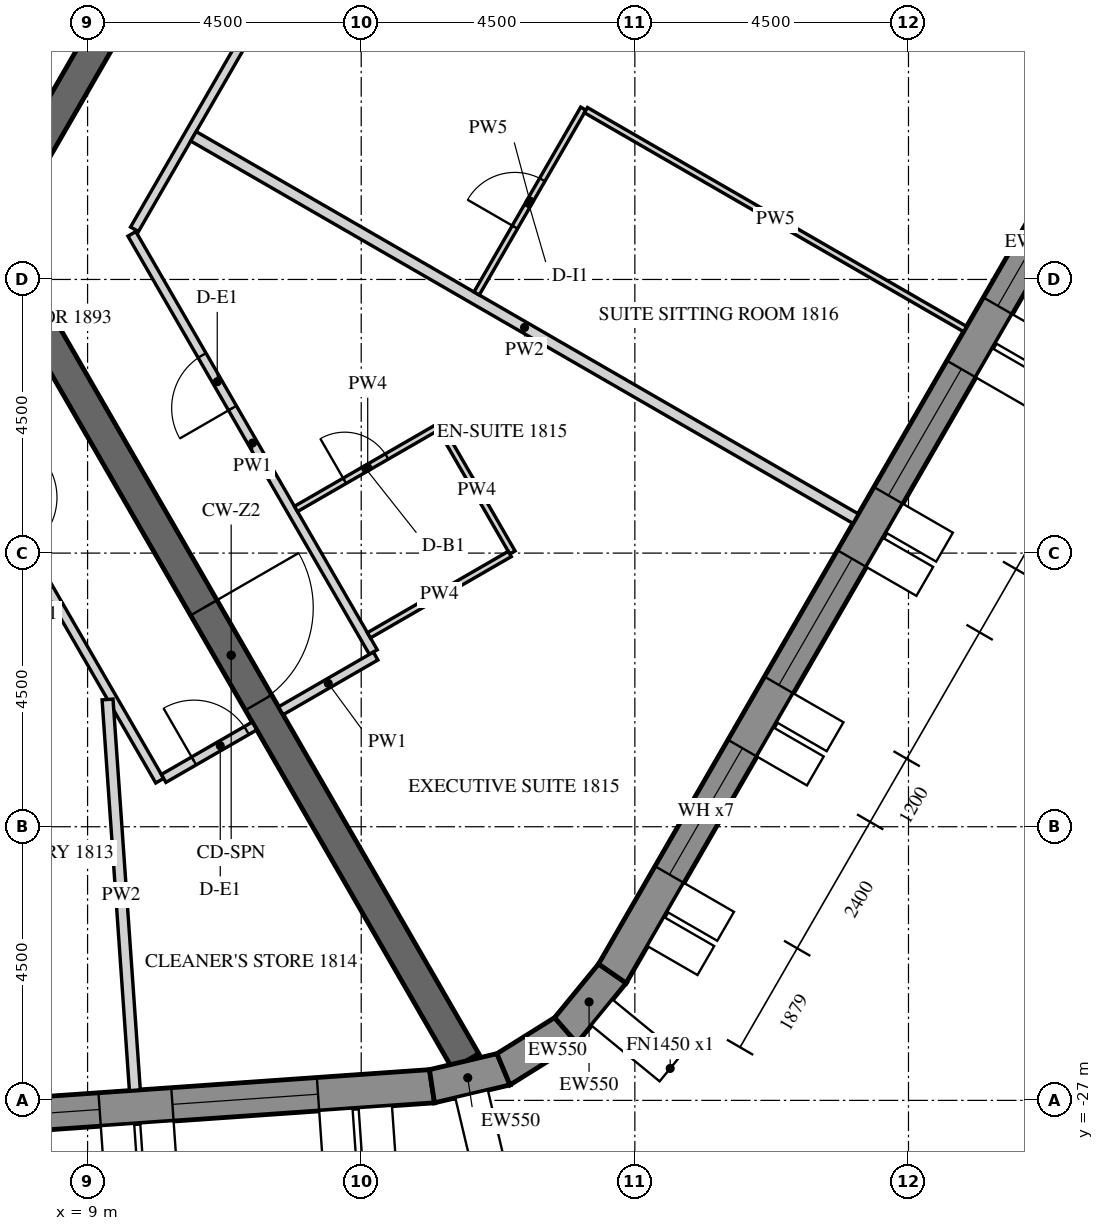
"""IFC4 building model, lengths in metres.
Left out: names, types, materials, properties, quantities, classifications, styles, units other than length and angle.
Written with IfcOpenShell. Run it as: python <this file> out.ifc"""

import sys

from ifc_helpers import new_model, si_unit, direction, frame, frame_2d, origin, place, context, subcontext, project, spatial, polyline, rectangle, outline, extrude, element, fill, save


model = new_model("IFC4")
c1 = context("Model", 3, precision=1e-05, world=origin(), true_north=direction((0.0, 1.0)))
c2 = subcontext(c1, "Body", "Model", "MODEL_VIEW")
j1 = project(units=[si_unit("LENGTHUNIT", "METRE"), si_unit("PLANEANGLEUNIT", "RADIAN")], contexts=[c1])
p1 = place(None, origin())
s1 = spatial("IfcSite", under=j1, at=p1, CompositionType="ELEMENT")
p2 = place(p1, origin())
s2 = spatial("IfcBuilding", under=s1, at=p2, CompositionType="ELEMENT")
p3 = place(p2, frame((0.0, 0.0, 226.8)))
s3 = spatial("IfcBuildingStorey", under=s2, at=p3, CompositionType="ELEMENT", Elevation=226.8)
p4 = place(p3, frame((-13.026, -28.704, -0.15), z_axis=(0.0, 0.0, 1.0), x_axis=(0.99756406806, 0.069756219185, 0.0)))
e1 = element("IfcWall", 1, at=p4, inside=s3, PredefinedType="SOLIDWALL", context=c2, shape_type="SweptSolid", body=[
    extrude(outline(polyline([(-0.026, -0.275), (27.78, -0.275), (27.735, 0.275), (0.026, 0.275), (-0.026, -0.275)])), origin(), (0.0, 0.0, 1.0), 3.9),
])
p5 = place(p4, frame((1.879, 0.0, 1.05)))
e2 = element("IfcOpeningElement", 2, at=p5, cuts=e1, PredefinedType="OPENING", context=c2, shape_type="SweptSolid", body=[
    extrude(rectangle(XDim=2.4, YDim=2.4, at=frame_2d((1.2, 1.2))), frame((0.0, 0.285, 0.0), z_axis=(0.0, -1.0, 0.0), x_axis=(1.0, 0.0, 0.0)), (0.0, 0.0, 1.0), 0.57),
])
p6 = place(p4, frame((5.479, 0.0, 1.05)))
e3 = element("IfcOpeningElement", 3, at=p6, cuts=e1, PredefinedType="OPENING", context=c2, shape_type="SweptSolid", body=[
    extrude(rectangle(XDim=2.4, YDim=2.4, at=frame_2d((1.2, 1.2))), frame((0.0, 0.285, 0.0), z_axis=(0.0, -1.0, 0.0), x_axis=(1.0, 0.0, 0.0)), (0.0, 0.0, 1.0), 0.57),
])
p7 = place(p4, frame((9.079, 0.0, 1.05)))
e4 = element("IfcOpeningElement", 4, at=p7, cuts=e1, PredefinedType="OPENING", context=c2, shape_type="SweptSolid", body=[
    extrude(rectangle(XDim=2.4, YDim=2.4, at=frame_2d((1.2, 1.2))), frame((0.0, 0.285, 0.0), z_axis=(0.0, -1.0, 0.0), x_axis=(1.0, 0.0, 0.0)), (0.0, 0.0, 1.0), 0.57),
])
p8 = place(p4, frame((12.679, 0.0, 1.05)))
e5 = element("IfcOpeningElement", 5, at=p8, cuts=e1, PredefinedType="OPENING", context=c2, shape_type="SweptSolid", body=[
    extrude(rectangle(XDim=2.4, YDim=2.4, at=frame_2d((1.2, 1.2))), frame((0.0, 0.285, 0.0), z_axis=(0.0, -1.0, 0.0), x_axis=(1.0, 0.0, 0.0)), (0.0, 0.0, 1.0), 0.57),
])
p9 = place(p4, frame((16.279, 0.0, 1.05)))
e6 = element("IfcOpeningElement", 6, at=p9, cuts=e1, PredefinedType="OPENING", context=c2, shape_type="SweptSolid", body=[
    extrude(rectangle(XDim=2.4, YDim=2.4, at=frame_2d((1.2, 1.2))), frame((0.0, 0.285, 0.0), z_axis=(0.0, -1.0, 0.0), x_axis=(1.0, 0.0, 0.0)), (0.0, 0.0, 1.0), 0.57),
])
p10 = place(p4, frame((19.879, 0.0, 1.05)))
e7 = element("IfcOpeningElement", 7, at=p10, cuts=e1, PredefinedType="OPENING", context=c2, shape_type="SweptSolid", body=[
    extrude(rectangle(XDim=2.4, YDim=2.4, at=frame_2d((1.2, 1.2))), frame((0.0, 0.285, 0.0), z_axis=(0.0, -1.0, 0.0), x_axis=(1.0, 0.0, 0.0)), (0.0, 0.0, 1.0), 0.57),
])
p11 = place(p4, frame((23.479, 0.0, 1.05)))
e8 = element("IfcOpeningElement", 8, at=p11, cuts=e1, PredefinedType="OPENING", context=c2, shape_type="SweptSolid", body=[
    extrude(rectangle(XDim=2.4, YDim=2.4, at=frame_2d((1.2, 1.2))), frame((0.0, 0.285, 0.0), z_axis=(0.0, -1.0, 0.0), x_axis=(1.0, 0.0, 0.0)), (0.0, 0.0, 1.0), 0.57),
])
p12 = place(p3, frame((14.664, -26.767, -0.15), z_axis=(0.0, 0.0, 1.0), x_axis=(0.973063591128, 0.230536868247, 0.0)))
e9 = element("IfcWall", 9, at=p12, inside=s3, PredefinedType="SOLIDWALL", context=c2, shape_type="SweptSolid", body=[
    extrude(outline(polyline([(-0.022, -0.275), (1.253, -0.275), (1.163, 0.275), (0.022, 0.275), (-0.022, -0.275)])), origin(), (0.0, 0.0, 1.0), 3.9),
])
p13 = place(p3, frame((15.84, -26.489, -0.15), z_axis=(0.0, 0.0, 1.0), x_axis=(0.848009655012, 0.52998077796, 0.0)))
e10 = element("IfcWall", 10, at=p13, inside=s3, PredefinedType="SOLIDWALL", context=c2, shape_type="SweptSolid", body=[
    extrude(outline(polyline([(-0.045, -0.275), (1.253, -0.275), (1.163, 0.275), (0.045, 0.275), (-0.045, -0.275)])), origin(), (0.0, 0.0, 1.0), 3.9),
])
p14 = place(p3, frame((16.864, -25.848, -0.15), z_axis=(0.0, 0.0, 1.0), x_axis=(0.633842757806, 0.773461930787, 0.0)))
e11 = element("IfcWall", 11, at=p14, inside=s3, PredefinedType="SOLIDWALL", context=c2, shape_type="SweptSolid", body=[
    extrude(outline(polyline([(-0.045, -0.275), (1.231, -0.275), (1.186, 0.275), (0.045, 0.275), (-0.045, -0.275)])), origin(), (0.0, 0.0, 1.0), 3.9),
])
p15 = place(p3, frame((17.63, -24.914, -0.15), z_axis=(0.0, 0.0, 1.0), x_axis=(0.499998569178, 0.866026229868, 0.0)))
e12 = element("IfcWall", 12, at=p15, inside=s3, PredefinedType="SOLIDWALL", context=c2, shape_type="SweptSolid", body=[
    extrude(outline(polyline([(-0.022, -0.275), (27.783, -0.275), (27.732, 0.275), (0.022, 0.275), (-0.022, -0.275)])), origin(), (0.0, 0.0, 1.0), 3.9),
])
p16 = place(p15, frame((1.879, 0.0, 1.05)))
e13 = element("IfcOpeningElement", 13, at=p16, cuts=e12, PredefinedType="OPENING", context=c2, shape_type="SweptSolid", body=[
    extrude(rectangle(XDim=2.4, YDim=2.4, at=frame_2d((1.2, 1.2))), frame((0.0, 0.285, 0.0), z_axis=(0.0, -1.0, 0.0), x_axis=(1.0, 0.0, 0.0)), (0.0, 0.0, 1.0), 0.57),
])
p17 = place(p15, frame((5.479, 0.0, 1.05)))
e14 = element("IfcOpeningElement", 14, at=p17, cuts=e12, PredefinedType="OPENING", context=c2, shape_type="SweptSolid", body=[
    extrude(rectangle(XDim=2.4, YDim=2.4, at=frame_2d((1.2, 1.2))), frame((0.0, 0.285, 0.0), z_axis=(0.0, -1.0, 0.0), x_axis=(1.0, 0.0, 0.0)), (0.0, 0.0, 1.0), 0.57),
])
p18 = place(p15, frame((9.079, 0.0, 1.05)))
e15 = element("IfcOpeningElement", 15, at=p18, cuts=e12, PredefinedType="OPENING", context=c2, shape_type="SweptSolid", body=[
    extrude(rectangle(XDim=2.4, YDim=2.4, at=frame_2d((1.2, 1.2))), frame((0.0, 0.285, 0.0), z_axis=(0.0, -1.0, 0.0), x_axis=(1.0, 0.0, 0.0)), (0.0, 0.0, 1.0), 0.57),
])
p19 = place(p15, frame((12.679, 0.0, 1.05)))
e16 = element("IfcOpeningElement", 16, at=p19, cuts=e12, PredefinedType="OPENING", context=c2, shape_type="SweptSolid", body=[
    extrude(rectangle(XDim=2.4, YDim=2.4, at=frame_2d((1.2, 1.2))), frame((0.0, 0.285, 0.0), z_axis=(0.0, -1.0, 0.0), x_axis=(1.0, 0.0, 0.0)), (0.0, 0.0, 1.0), 0.57),
])
p20 = place(p15, frame((16.279, 0.0, 1.05)))
e17 = element("IfcOpeningElement", 17, at=p20, cuts=e12, PredefinedType="OPENING", context=c2, shape_type="SweptSolid", body=[
    extrude(rectangle(XDim=2.4, YDim=2.4, at=frame_2d((1.2, 1.2))), frame((0.0, 0.285, 0.0), z_axis=(0.0, -1.0, 0.0), x_axis=(1.0, 0.0, 0.0)), (0.0, 0.0, 1.0), 0.57),
])
p21 = place(p15, frame((19.879, 0.0, 1.05)))
e18 = element("IfcOpeningElement", 18, at=p21, cuts=e12, PredefinedType="OPENING", context=c2, shape_type="SweptSolid", body=[
    extrude(rectangle(XDim=2.4, YDim=2.4, at=frame_2d((1.2, 1.2))), frame((0.0, 0.285, 0.0), z_axis=(0.0, -1.0, 0.0), x_axis=(1.0, 0.0, 0.0)), (0.0, 0.0, 1.0), 0.57),
])
p22 = place(p15, frame((23.479, 0.0, 1.05)))
e19 = element("IfcOpeningElement", 19, at=p22, cuts=e12, PredefinedType="OPENING", context=c2, shape_type="SweptSolid", body=[
    extrude(rectangle(XDim=2.4, YDim=2.4, at=frame_2d((1.2, 1.2))), frame((0.0, 0.285, 0.0), z_axis=(0.0, -1.0, 0.0), x_axis=(1.0, 0.0, 0.0)), (0.0, 0.0, 1.0), 0.57),
])
p23 = place(p3, frame((7.361, -12.75, -0.15), z_axis=(0.0, 0.0, 1.0), x_axis=(0.50000571537, 0.866022103989, 0.0)))
e20 = element("IfcWall", 20, at=p23, inside=s3, PredefinedType="SHEAR", context=c2, shape_type="SweptSolid", body=[
    extrude(outline(polyline([(-0.144, -0.25), (14.867, -0.25), (14.578, 0.25), (0.144, 0.25), (-0.144, -0.25)])), origin(), (0.0, 0.0, 1.0), 3.9),
])
p24 = place(p23, frame((6.49, 0.0, 0.15)))
e21 = element("IfcOpeningElement", 21, at=p24, cuts=e20, PredefinedType="OPENING", context=c2, shape_type="SweptSolid", body=[
    extrude(rectangle(XDim=1.8, YDim=2.4, at=frame_2d((0.9, 1.2))), frame((0.0, 0.26, 0.0), z_axis=(0.0, -1.0, 0.0), x_axis=(1.0, 0.0, 0.0)), (0.0, 0.0, 1.0), 0.52),
])
p25 = place(p3, frame((7.506, -13.0, -0.15), z_axis=(0.0, 0.0, 1.0), x_axis=(0.499988271576, -0.866032175087, 0.0)))
e22 = element("IfcWall", 22, at=p25, inside=s3, PredefinedType="SHEAR", context=c2, shape_type="SweptSolid", body=[
    extrude(rectangle(XDim=15.424, YDim=0.5, at=frame_2d((7.712, 0.0))), origin(), (0.0, 0.0, 1.0), 3.9),
])
p26 = place(p25, frame((6.812, 0.0, 0.15)))
e23 = element("IfcOpeningElement", 23, at=p26, cuts=e22, PredefinedType="OPENING", context=c2, shape_type="SweptSolid", body=[
    extrude(rectangle(XDim=1.8, YDim=2.4, at=frame_2d((0.9, 1.2))), frame((0.0, 0.26, 0.0), z_axis=(0.0, -1.0, 0.0), x_axis=(1.0, 0.0, 0.0)), (0.0, 0.0, 1.0), 0.52),
])
p27 = place(p3, frame((5.673, -9.825, -0.15), z_axis=(0.0, 0.0, 1.0), x_axis=(0.499995046907, 0.866028263435, 0.0)))
e24 = element("IfcWall", 24, at=p27, inside=s3, PredefinedType="SHEAR", context=c2, shape_type="SweptSolid", body=[
    extrude(outline(polyline([(-0.101, -0.175), (11.446, -0.175), (11.244, 0.175), (0.101, 0.175), (-0.101, -0.175)])), origin(), (0.0, 0.0, 1.0), 3.9),
])
p28 = place(p27, frame((4.801, 0.0, 0.15)))
e25 = element("IfcOpeningElement", 25, at=p28, cuts=e24, PredefinedType="OPENING", context=c2, shape_type="SweptSolid", body=[
    extrude(rectangle(XDim=1.8, YDim=2.4, at=frame_2d((0.9, 1.2))), frame((0.0, 0.185, 0.0), z_axis=(0.0, -1.0, 0.0), x_axis=(1.0, 0.0, 0.0)), (0.0, 0.0, 1.0), 0.37),
])
p29 = place(p3, frame((6.221, -14.875, 0.0), z_axis=(0.0, 0.0, 1.0), x_axis=(0.499989830942, -0.866031274813, 0.0)))
e26 = element("IfcWall", 26, at=p29, inside=s3, PredefinedType="PARTITIONING", context=c2, shape_type="SweptSolid", body=[
    extrude(rectangle(XDim=7.93, YDim=0.15, at=frame_2d((3.965, 0.0))), origin(), (0.0, 0.0, 1.0), 2.988),
])
p30 = place(p29, frame((2.552, 0.0, 0.0)))
e27 = element("IfcOpeningElement", 27, at=p30, cuts=e26, PredefinedType="OPENING", context=c2, shape_type="SweptSolid", body=[
    extrude(rectangle(XDim=1.0, YDim=2.1, at=frame_2d((0.5, 1.05))), frame((0.0, 0.085, 0.0), z_axis=(0.0, -1.0, 0.0), x_axis=(1.0, 0.0, 0.0)), (0.0, 0.0, 1.0), 0.17),
])
p31 = place(p3, frame((10.251, -21.705, 0.0), z_axis=(0.0, 0.0, 1.0), x_axis=(0.866013532718, 0.500020560727, 0.0)))
e28 = element("IfcWall", 28, at=p31, inside=s3, PredefinedType="PARTITIONING", context=c2, shape_type="SweptSolid", body=[
    extrude(rectangle(XDim=1.725, YDim=0.15, at=frame_2d((0.863, 0.0))), origin(), (0.0, 0.0, 1.0), 2.988),
])
p32 = place(p31, frame((0.575, 0.0, 0.0)))
e29 = element("IfcOpeningElement", 29, at=p32, cuts=e28, PredefinedType="OPENING", context=c2, shape_type="SweptSolid", body=[
    extrude(rectangle(XDim=1.0, YDim=2.1, at=frame_2d((0.5, 1.05))), frame((0.0, 0.085, 0.0), z_axis=(0.0, -1.0, 0.0), x_axis=(1.0, 0.0, 0.0)), (0.0, 0.0, 1.0), 0.17),
])
p33 = place(p3, frame((13.699, -19.628, 0.0), z_axis=(0.0, 0.0, 1.0), x_axis=(-0.499997422768, 0.866026891745, 0.0)))
e30 = element("IfcWall", 30, at=p33, inside=s3, PredefinedType="PARTITIONING", context=c2, shape_type="SweptSolid", body=[
    extrude(rectangle(XDim=7.942, YDim=0.15, at=frame_2d((3.971, 0.0))), origin(), (0.0, 0.0, 1.0), 2.988),
])
p34 = place(p33, frame((4.634, 0.0, 0.0)))
e31 = element("IfcOpeningElement", 31, at=p34, cuts=e30, PredefinedType="OPENING", context=c2, shape_type="SweptSolid", body=[
    extrude(rectangle(XDim=1.0, YDim=2.1, at=frame_2d((0.5, 1.05))), frame((0.0, 0.085, 0.0), z_axis=(0.0, -1.0, 0.0), x_axis=(1.0, 0.0, 0.0)), (0.0, 0.0, 1.0), 0.17),
])
p35 = place(p3, frame((9.772, -12.675, 0.0), z_axis=(0.0, 0.0, 1.0), x_axis=(0.499996322767, 0.866027526826, 0.0)))
e32 = element("IfcWall", 32, at=p35, inside=s3, PredefinedType="PARTITIONING", context=c2, shape_type="SweptSolid", body=[
    extrude(rectangle(XDim=14.636, YDim=0.15, at=frame_2d((7.318, 0.0))), origin(), (0.0, 0.0, 1.0), 2.988),
])
p36 = place(p35, frame((5.309, 0.0, 0.0)))
e33 = element("IfcOpeningElement", 33, at=p36, cuts=e32, PredefinedType="OPENING", context=c2, shape_type="SweptSolid", body=[
    extrude(rectangle(XDim=1.0, YDim=2.1, at=frame_2d((0.5, 1.05))), frame((0.0, 0.085, 0.0), z_axis=(0.0, -1.0, 0.0), x_axis=(1.0, 0.0, 0.0)), (0.0, 0.0, 1.0), 0.17),
])
p37 = place(p35, frame((13.486, 0.0, 0.0)))
e34 = element("IfcOpeningElement", 34, at=p37, cuts=e32, PredefinedType="OPENING", context=c2, shape_type="SweptSolid", body=[
    extrude(rectangle(XDim=1.0, YDim=2.1, at=frame_2d((0.5, 1.05))), frame((0.0, 0.085, 0.0), z_axis=(0.0, -1.0, 0.0), x_axis=(1.0, 0.0, 0.0)), (0.0, 0.0, 1.0), 0.17),
])
p38 = place(p3, frame((12.178, -20.593, 0.0), z_axis=(0.0, 0.0, 1.0), x_axis=(0.866047807691, 0.499961193289, 0.0)))
e35 = element("IfcWall", 35, at=p38, inside=s3, PredefinedType="PARTITIONING", context=c2, shape_type="SweptSolid", body=[
    extrude(rectangle(XDim=1.8, YDim=0.15, at=frame_2d((0.9, 0.0))), origin(), (0.0, 0.0, 1.0), 2.988),
])
p39 = place(p3, frame((9.778, -26.833, 0.0), z_axis=(0.0, 0.0, 1.0), x_axis=(-0.069733334443, 0.997565668048, 0.0)))
e36 = element("IfcWall", 36, at=p39, inside=s3, PredefinedType="PARTITIONING", context=c2, shape_type="SweptSolid", body=[
    extrude(rectangle(XDim=6.442, YDim=0.18, at=frame_2d((3.221, 0.0))), origin(), (0.0, 0.0, 1.0), 2.988),
])
p40 = place(p3, frame((12.427, -17.274, 0.0), z_axis=(0.0, 0.0, 1.0), x_axis=(0.866051307416, 0.49995513091, 0.0)))
e37 = element("IfcWall", 37, at=p40, inside=s3, PredefinedType="PARTITIONING", context=c2, shape_type="SweptSolid", body=[
    extrude(rectangle(XDim=2.725, YDim=0.1, at=frame_2d((1.362, 0.0))), origin(), (0.0, 0.0, 1.0), 2.988),
])
p41 = place(p40, frame((0.925, 0.0, 0.0)))
e38 = element("IfcOpeningElement", 38, at=p41, cuts=e37, PredefinedType="OPENING", context=c2, shape_type="SweptSolid", body=[
    extrude(rectangle(XDim=0.8, YDim=2.1, at=frame_2d((0.4, 1.05))), frame((0.0, 0.06, 0.0), z_axis=(0.0, -1.0, 0.0), x_axis=(1.0, 0.0, 0.0)), (0.0, 0.0, 1.0), 0.12),
])
p42 = place(p3, frame((14.812, -15.955, 0.0), z_axis=(0.0, 0.0, 1.0), x_axis=(0.499938297808, -0.866061024631, 0.0)))
e39 = element("IfcWall", 39, at=p42, inside=s3, PredefinedType="PARTITIONING", context=c2, shape_type="SweptSolid", body=[
    extrude(rectangle(XDim=2.35, YDim=0.1, at=frame_2d((1.175, 0.0))), origin(), (0.0, 0.0, 1.0), 2.988),
])
p43 = place(p3, frame((15.943, -18.015, 0.0), z_axis=(0.0, 0.0, 1.0), x_axis=(-0.866004723184, -0.50003581814, 0.0)))
e40 = element("IfcWall", 40, at=p43, inside=s3, PredefinedType="PARTITIONING", context=c2, shape_type="SweptSolid", body=[
    extrude(rectangle(XDim=2.675, YDim=0.1, at=frame_2d((1.337, 0.0))), origin(), (0.0, 0.0, 1.0), 2.988),
])
p44 = place(p3, frame((21.631, -17.433, 0.0), z_axis=(0.0, 0.0, 1.0), x_axis=(-0.866032662629, 0.499987427101, 0.0)))
e41 = element("IfcWall", 41, at=p44, inside=s3, PredefinedType="PARTITIONING", context=c2, shape_type="SweptSolid", body=[
    extrude(rectangle(XDim=12.575, YDim=0.18, at=frame_2d((6.288, 0.0))), origin(), (0.0, 0.0, 1.0), 2.988),
])
p45 = place(p3, frame((15.398, -13.73, 0.0), z_axis=(0.0, 0.0, 1.0), x_axis=(0.499969314921, 0.866043119098, 0.0)))
e42 = element("IfcWall", 42, at=p45, inside=s3, PredefinedType="PARTITIONING", context=c2, shape_type="SweptSolid", body=[
    extrude(rectangle(XDim=3.51, YDim=0.1, at=frame_2d((1.755, 0.0))), origin(), (0.0, 0.0, 1.0), 2.988),
])
p46 = place(p45, frame((1.26, 0.0, 0.0)))
e43 = element("IfcOpeningElement", 43, at=p46, cuts=e42, PredefinedType="OPENING", context=c2, shape_type="SweptSolid", body=[
    extrude(rectangle(XDim=0.9, YDim=2.1, at=frame_2d((0.45, 1.05))), frame((0.0, 0.06, 0.0), z_axis=(0.0, -1.0, 0.0), x_axis=(1.0, 0.0, 0.0)), (0.0, 0.0, 1.0), 0.12),
])
p47 = place(p3, frame((17.196, -10.716, 0.0), z_axis=(0.0, 0.0, 1.0), x_axis=(0.866033125095, -0.499986626058, 0.0)))
e44 = element("IfcWall", 44, at=p47, inside=s3, PredefinedType="PARTITIONING", context=c2, shape_type="SweptSolid", body=[
    extrude(rectangle(XDim=7.2, YDim=0.1, at=frame_2d((3.6, 0.0))), origin(), (0.0, 0.0, 1.0), 2.988),
])
p48 = place(p10, frame((0.0, 0.205, 0.0)))
e45 = element("IfcWindow", 45, at=p48, inside=s3, PartitioningType="DOUBLE_PANEL_VERTICAL", PredefinedType="WINDOW", context=c2, shape_type="SweptSolid", body=[
    extrude(rectangle(XDim=2.4, YDim=2.4, at=frame_2d((1.2, 1.2))), frame((0.0, 0.03, 0.0), z_axis=(0.0, -1.0, 0.0), x_axis=(1.0, 0.0, 0.0)), (0.0, 0.0, 1.0), 0.06),
])
fill(e7, e45)
p49 = place(p11, frame((0.0, 0.205, 0.0)))
e46 = element("IfcWindow", 46, at=p49, inside=s3, PartitioningType="DOUBLE_PANEL_VERTICAL", PredefinedType="WINDOW", context=c2, shape_type="SweptSolid", body=[
    extrude(rectangle(XDim=2.4, YDim=2.4, at=frame_2d((1.2, 1.2))), frame((0.0, 0.03, 0.0), z_axis=(0.0, -1.0, 0.0), x_axis=(1.0, 0.0, 0.0)), (0.0, 0.0, 1.0), 0.06),
])
fill(e8, e46)
p50 = place(p16, frame((0.0, 0.205, 0.0)))
e47 = element("IfcWindow", 47, at=p50, inside=s3, PartitioningType="DOUBLE_PANEL_VERTICAL", PredefinedType="WINDOW", context=c2, shape_type="SweptSolid", body=[
    extrude(rectangle(XDim=2.4, YDim=2.4, at=frame_2d((1.2, 1.2))), frame((0.0, 0.03, 0.0), z_axis=(0.0, -1.0, 0.0), x_axis=(1.0, 0.0, 0.0)), (0.0, 0.0, 1.0), 0.06),
])
fill(e13, e47)
p51 = place(p17, frame((0.0, 0.205, 0.0)))
e48 = element("IfcWindow", 48, at=p51, inside=s3, PartitioningType="DOUBLE_PANEL_VERTICAL", PredefinedType="WINDOW", context=c2, shape_type="SweptSolid", body=[
    extrude(rectangle(XDim=2.4, YDim=2.4, at=frame_2d((1.2, 1.2))), frame((0.0, 0.03, 0.0), z_axis=(0.0, -1.0, 0.0), x_axis=(1.0, 0.0, 0.0)), (0.0, 0.0, 1.0), 0.06),
])
fill(e14, e48)
p52 = place(p18, frame((0.0, 0.205, 0.0)))
e49 = element("IfcWindow", 49, at=p52, inside=s3, PartitioningType="DOUBLE_PANEL_VERTICAL", PredefinedType="WINDOW", context=c2, shape_type="SweptSolid", body=[
    extrude(rectangle(XDim=2.4, YDim=2.4, at=frame_2d((1.2, 1.2))), frame((0.0, 0.03, 0.0), z_axis=(0.0, -1.0, 0.0), x_axis=(1.0, 0.0, 0.0)), (0.0, 0.0, 1.0), 0.06),
])
fill(e15, e49)
p53 = place(p19, frame((0.0, 0.205, 0.0)))
e50 = element("IfcWindow", 50, at=p53, inside=s3, PartitioningType="DOUBLE_PANEL_VERTICAL", PredefinedType="WINDOW", context=c2, shape_type="SweptSolid", body=[
    extrude(rectangle(XDim=2.4, YDim=2.4, at=frame_2d((1.2, 1.2))), frame((0.0, 0.03, 0.0), z_axis=(0.0, -1.0, 0.0), x_axis=(1.0, 0.0, 0.0)), (0.0, 0.0, 1.0), 0.06),
])
fill(e16, e50)
p54 = place(p26, origin())
e51 = element("IfcDoor", 51, at=p54, inside=s3, OperationType="DOUBLE_DOOR_SINGLE_SWING", PredefinedType="DOOR", context=c2, shape_type="SweptSolid", body=[
    extrude(rectangle(XDim=1.8, YDim=2.4, at=frame_2d((0.9, 1.2))), frame((0.0, 0.025, 0.0), z_axis=(0.0, -1.0, 0.0), x_axis=(1.0, 0.0, 0.0)), (0.0, 0.0, 1.0), 0.05),
])
fill(e23, e51)
p55 = place(p32, origin())
e52 = element("IfcDoor", 52, at=p55, inside=s3, OperationType="SINGLE_SWING_LEFT", PredefinedType="DOOR", context=c2, shape_type="SweptSolid", body=[
    extrude(rectangle(XDim=1.0, YDim=2.1, at=frame_2d((0.5, 1.05))), frame((0.0, 0.025, 0.0), z_axis=(0.0, -1.0, 0.0), x_axis=(1.0, 0.0, 0.0)), (0.0, 0.0, 1.0), 0.05),
])
fill(e29, e52)
p56 = place(p34, origin())
e53 = element("IfcDoor", 53, at=p56, inside=s3, OperationType="SINGLE_SWING_LEFT", PredefinedType="DOOR", context=c2, shape_type="SweptSolid", body=[
    extrude(rectangle(XDim=1.0, YDim=2.1, at=frame_2d((0.5, 1.05))), frame((0.0, 0.025, 0.0), z_axis=(0.0, -1.0, 0.0), x_axis=(1.0, 0.0, 0.0)), (0.0, 0.0, 1.0), 0.05),
])
fill(e31, e53)
p57 = place(p41, origin())
e54 = element("IfcDoor", 54, at=p57, inside=s3, OperationType="SINGLE_SWING_RIGHT", PredefinedType="DOOR", context=c2, shape_type="SweptSolid", body=[
    extrude(rectangle(XDim=0.8, YDim=2.1, at=frame_2d((0.4, 1.05))), frame((0.0, 0.025, 0.0), z_axis=(0.0, -1.0, 0.0), x_axis=(1.0, 0.0, 0.0)), (0.0, 0.0, 1.0), 0.05),
])
fill(e38, e54)
p58 = place(p46, origin())
e55 = element("IfcDoor", 55, at=p58, inside=s3, OperationType="SINGLE_SWING_RIGHT", PredefinedType="DOOR", context=c2, shape_type="SweptSolid", body=[
    extrude(rectangle(XDim=0.9, YDim=2.1, at=frame_2d((0.45, 1.05))), frame((0.0, 0.025, 0.0), z_axis=(0.0, -1.0, 0.0), x_axis=(1.0, 0.0, 0.0)), (0.0, 0.0, 1.0), 0.05),
])
fill(e43, e55)
save(model, sys.argv[1])
